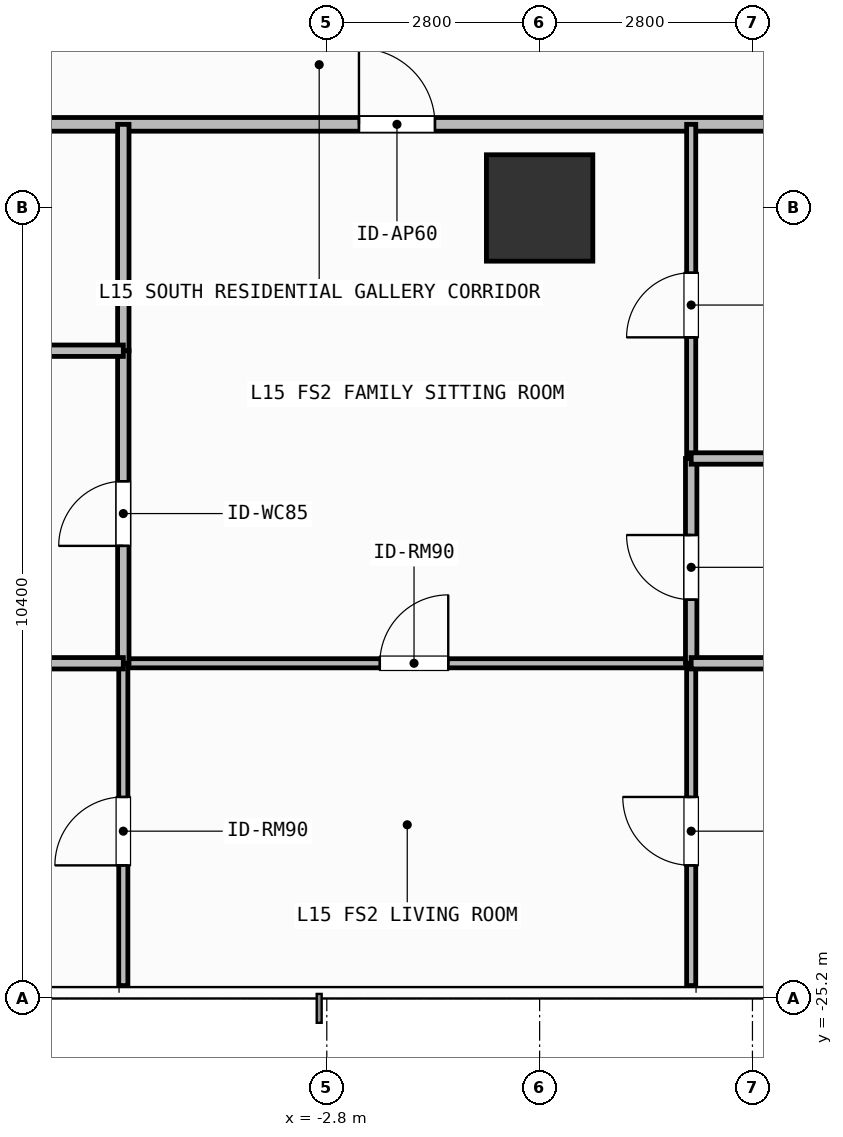
"""IFC4 building model, lengths in metres.
Left out: names, types, materials, properties, quantities, classifications, styles, units other than length and angle.
Written with IfcOpenShell. Run it as: python <this file> out.ifc"""

import sys

from ifc_helpers import new_model, si_unit, direction, frame, frame_2d, origin, origin_2d, place, context, subcontext, project, spatial, rectangle, extrude, element, fill, save


model = new_model("IFC4")
c1 = context("Model", 3, precision=1e-05, world=origin(), true_north=direction((0.0, 1.0)))
c2 = subcontext(c1, "Body", "Model", "MODEL_VIEW")
j1 = project(units=[si_unit("LENGTHUNIT", "METRE"), si_unit("PLANEANGLEUNIT", "RADIAN")], contexts=[c1])
p1 = place(None, origin())
s1 = spatial("IfcSite", under=j1, at=p1, CompositionType="ELEMENT")
p2 = place(p1, origin())
s2 = spatial("IfcBuilding", under=s1, at=p2, CompositionType="ELEMENT")
p3 = place(p2, frame((0.0, 0.0, 57.9)))
s3 = spatial("IfcBuildingStorey", under=s2, at=p3, CompositionType="ELEMENT", Elevation=57.9)
p4 = place(p3, frame((0.0, -14.8, 0.0), z_axis=(0.0, 0.0, 1.0), x_axis=(1.0, 0.0, 0.0)))
e1 = element("IfcColumn", 1, at=p4, inside=s3, PredefinedType="COLUMN", context=c2, shape_type="SweptSolid", body=[
    extrude(rectangle(XDim=1.4, YDim=1.4, at=origin_2d()), origin(), (0.0, 0.0, 1.0), 3.9),
])
p5 = place(p3, frame((-12.225, -13.7, 0.0), z_axis=(0.0, 0.0, 1.0), x_axis=(1.0, 0.0, 0.0)))
e2 = element("IfcWall", 2, at=p5, inside=s3, PredefinedType="PARTITIONING", context=c2, shape_type="SweptSolid", body=[
    extrude(rectangle(XDim=17.467, YDim=0.18, at=frame_2d((8.733, 0.0))), origin(), (0.0, 0.0, 1.0), 3.68),
])
p6 = place(p5, frame((9.848, 0.0, 0.0)))
e3 = element("IfcOpeningElement", 3, at=p6, cuts=e2, PredefinedType="OPENING", context=c2, shape_type="SweptSolid", body=[
    extrude(rectangle(XDim=1.0, YDim=2.2, at=frame_2d((0.5, 1.1))), frame((0.0, 0.1, 0.0), z_axis=(0.0, -1.0, 0.0), x_axis=(1.0, 0.0, 0.0)), (0.0, 0.0, 1.0), 0.2),
])
p7 = place(p3, frame((-5.477, -20.79, 0.0), z_axis=(0.0, 0.0, 1.0), x_axis=(1.0, 0.0, 0.0)))
e4 = element("IfcWall", 4, at=p7, inside=s3, PredefinedType="PARTITIONING", context=c2, shape_type="SweptSolid", body=[
    extrude(rectangle(XDim=7.471, YDim=0.12, at=frame_2d((3.735, 0.0))), origin(), (0.0, 0.0, 1.0), 3.68),
])
p8 = place(p7, frame((3.375, 0.0, 0.0)))
e5 = element("IfcOpeningElement", 5, at=p8, cuts=e4, PredefinedType="OPENING", context=c2, shape_type="SweptSolid", body=[
    extrude(rectangle(XDim=0.9, YDim=2.1, at=frame_2d((0.45, 1.05))), frame((0.0, 0.07, 0.0), z_axis=(0.0, -1.0, 0.0), x_axis=(1.0, 0.0, 0.0)), (0.0, 0.0, 1.0), 0.14),
])
p9 = place(p3, frame((-5.477, -20.79, 0.0), z_axis=(0.0, 0.0, 1.0), x_axis=(0.0, 1.0, 0.0)))
e6 = element("IfcWall", 6, at=p9, inside=s3, PredefinedType="PARTITIONING", context=c2, shape_type="SweptSolid", body=[
    extrude(rectangle(XDim=4.112, YDim=0.15, at=frame_2d((2.056, 0.0))), origin(), (0.0, 0.0, 1.0), 3.68),
])
p10 = place(p9, frame((1.544, 0.0, 0.0)))
e7 = element("IfcOpeningElement", 7, at=p10, cuts=e6, PredefinedType="OPENING", context=c2, shape_type="SweptSolid", body=[
    extrude(rectangle(XDim=0.85, YDim=2.1, at=frame_2d((0.425, 1.05))), frame((0.0, 0.085, 0.0), z_axis=(0.0, -1.0, 0.0), x_axis=(1.0, 0.0, 0.0)), (0.0, 0.0, 1.0), 0.17),
])
p11 = place(p3, frame((-5.477, -16.678, 0.0), z_axis=(0.0, 0.0, 1.0), x_axis=(0.0, 1.0, 0.0)))
e8 = element("IfcWall", 8, at=p11, inside=s3, PredefinedType="PARTITIONING", context=c2, shape_type="SweptSolid", body=[
    extrude(rectangle(XDim=2.978, YDim=0.15, at=frame_2d((1.489, 0.0))), origin(), (0.0, 0.0, 1.0), 3.68),
])
p12 = place(p3, frame((-5.477, -25.03, 0.0), z_axis=(0.0, 0.0, 1.0), x_axis=(0.0, 1.0, 0.0)))
e9 = element("IfcWall", 9, at=p12, inside=s3, PredefinedType="PARTITIONING", context=c2, shape_type="SweptSolid", body=[
    extrude(rectangle(XDim=4.24, YDim=0.12, at=frame_2d((2.12, 0.0))), origin(), (0.0, 0.0, 1.0), 3.68),
])
p13 = place(p12, frame((1.581, 0.0, 0.0)))
e10 = element("IfcOpeningElement", 10, at=p13, cuts=e9, PredefinedType="OPENING", context=c2, shape_type="SweptSolid", body=[
    extrude(rectangle(XDim=0.9, YDim=2.1, at=frame_2d((0.45, 1.05))), frame((0.0, 0.07, 0.0), z_axis=(0.0, -1.0, 0.0), x_axis=(1.0, 0.0, 0.0)), (0.0, 0.0, 1.0), 0.14),
])
p14 = place(p3, frame((1.994, -20.79, 0.0), z_axis=(0.0, 0.0, 1.0), x_axis=(0.0, 1.0, 0.0)))
e11 = element("IfcWall", 11, at=p14, inside=s3, PredefinedType="PARTITIONING", context=c2, shape_type="SweptSolid", body=[
    extrude(rectangle(XDim=2.694, YDim=0.15, at=frame_2d((1.347, 0.0))), origin(), (0.0, 0.0, 1.0), 3.68),
])
p15 = place(p14, frame((0.837, 0.0, 0.0)))
e12 = element("IfcOpeningElement", 12, at=p15, cuts=e11, PredefinedType="OPENING", context=c2, shape_type="SweptSolid", body=[
    extrude(rectangle(XDim=0.85, YDim=2.1, at=frame_2d((0.425, 1.05))), frame((0.0, 0.085, 0.0), z_axis=(0.0, -1.0, 0.0), x_axis=(1.0, 0.0, 0.0)), (0.0, 0.0, 1.0), 0.17),
])
p16 = place(p3, frame((1.994, -18.096, 0.0), z_axis=(0.0, 0.0, 1.0), x_axis=(0.0, 1.0, 0.0)))
e13 = element("IfcWall", 13, at=p16, inside=s3, PredefinedType="PARTITIONING", context=c2, shape_type="SweptSolid", body=[
    extrude(rectangle(XDim=4.396, YDim=0.12, at=frame_2d((2.198, 0.0))), origin(), (0.0, 0.0, 1.0), 3.68),
])
p17 = place(p16, frame((1.594, 0.0, 0.0)))
e14 = element("IfcOpeningElement", 14, at=p17, cuts=e13, PredefinedType="OPENING", context=c2, shape_type="SweptSolid", body=[
    extrude(rectangle(XDim=0.85, YDim=2.1, at=frame_2d((0.425, 1.05))), frame((0.0, 0.07, 0.0), z_axis=(0.0, -1.0, 0.0), x_axis=(1.0, 0.0, 0.0)), (0.0, 0.0, 1.0), 0.14),
])
p18 = place(p3, frame((1.994, -25.03, 0.0), z_axis=(0.0, 0.0, 1.0), x_axis=(0.0, 1.0, 0.0)))
e15 = element("IfcWall", 15, at=p18, inside=s3, PredefinedType="PARTITIONING", context=c2, shape_type="SweptSolid", body=[
    extrude(rectangle(XDim=4.24, YDim=0.12, at=frame_2d((2.12, 0.0))), origin(), (0.0, 0.0, 1.0), 3.68),
])
p19 = place(p18, frame((1.581, 0.0, 0.0)))
e16 = element("IfcOpeningElement", 16, at=p19, cuts=e15, PredefinedType="OPENING", context=c2, shape_type="SweptSolid", body=[
    extrude(rectangle(XDim=0.9, YDim=2.1, at=frame_2d((0.45, 1.05))), frame((0.0, 0.07, 0.0), z_axis=(0.0, -1.0, 0.0), x_axis=(1.0, 0.0, 0.0)), (0.0, 0.0, 1.0), 0.14),
])
p20 = place(p3, frame((-12.225, -16.678, 0.0), z_axis=(0.0, 0.0, 1.0), x_axis=(1.0, 0.0, 0.0)))
e17 = element("IfcWall", 17, at=p20, inside=s3, PredefinedType="PARTITIONING", context=c2, shape_type="SweptSolid", body=[
    extrude(rectangle(XDim=6.748, YDim=0.15, at=frame_2d((3.374, 0.0))), origin(), (0.0, 0.0, 1.0), 3.68),
])
p21 = place(p20, frame((2.859, 0.0, 0.0)))
e18 = element("IfcOpeningElement", 18, at=p21, cuts=e17, PredefinedType="OPENING", context=c2, shape_type="SweptSolid", body=[
    extrude(rectangle(XDim=0.85, YDim=2.1, at=frame_2d((0.425, 1.05))), frame((0.0, 0.085, 0.0), z_axis=(0.0, -1.0, 0.0), x_axis=(1.0, 0.0, 0.0)), (0.0, 0.0, 1.0), 0.17),
])
p22 = place(p3, frame((-12.225, -20.79, 0.0), z_axis=(0.0, 0.0, 1.0), x_axis=(1.0, 0.0, 0.0)))
e19 = element("IfcWall", 19, at=p22, inside=s3, PredefinedType="PARTITIONING", context=c2, shape_type="SweptSolid", body=[
    extrude(rectangle(XDim=6.748, YDim=0.15, at=frame_2d((3.374, 0.0))), origin(), (0.0, 0.0, 1.0), 3.68),
])
for number, where, z_axis, x_axis in (
    (20, (1.994, -18.096, 0.0), (0.0, 0.0, 1.0), (1.0, 0.0, 0.0)),
    (21, (1.994, -20.79, 0.0), (0.0, 0.0, 1.0), (1.0, 0.0, 0.0)),
):
    element("IfcWall", number, at=place(p3, frame(where, z_axis=z_axis, x_axis=x_axis)), inside=s3, PredefinedType="PARTITIONING", context=c2, shape_type="SweptSolid", body=[
        extrude(rectangle(XDim=3.248, YDim=0.15, at=frame_2d((1.624, 0.0))), origin(), (0.0, 0.0, 1.0), 3.68),
    ])
p23 = place(p6, origin())
e22 = element("IfcDoor", 22, at=p23, inside=s3, OperationType="SINGLE_SWING_LEFT", PredefinedType="DOOR", context=c2, shape_type="SweptSolid", body=[
    extrude(rectangle(XDim=1.0, YDim=2.2, at=frame_2d((0.5, 1.1))), frame((0.0, 0.025, 0.0), z_axis=(0.0, -1.0, 0.0), x_axis=(1.0, 0.0, 0.0)), (0.0, 0.0, 1.0), 0.05),
])
fill(e3, e22)
p24 = place(p8, origin())
e23 = element("IfcDoor", 23, at=p24, inside=s3, OperationType="SINGLE_SWING_RIGHT", PredefinedType="DOOR", context=c2, shape_type="SweptSolid", body=[
    extrude(rectangle(XDim=0.9, YDim=2.1, at=frame_2d((0.45, 1.05))), frame((0.0, 0.025, 0.0), z_axis=(0.0, -1.0, 0.0), x_axis=(1.0, 0.0, 0.0)), (0.0, 0.0, 1.0), 0.05),
])
fill(e5, e23)
p25 = place(p10, origin())
e24 = element("IfcDoor", 24, at=p25, inside=s3, OperationType="SINGLE_SWING_LEFT", PredefinedType="DOOR", context=c2, shape_type="SweptSolid", body=[
    extrude(rectangle(XDim=0.85, YDim=2.1, at=frame_2d((0.425, 1.05))), frame((0.0, 0.025, 0.0), z_axis=(0.0, -1.0, 0.0), x_axis=(1.0, 0.0, 0.0)), (0.0, 0.0, 1.0), 0.05),
])
fill(e7, e24)
p26 = place(p13, origin())
e25 = element("IfcDoor", 25, at=p26, inside=s3, OperationType="SINGLE_SWING_LEFT", PredefinedType="DOOR", context=c2, shape_type="SweptSolid", body=[
    extrude(rectangle(XDim=0.9, YDim=2.1, at=frame_2d((0.45, 1.05))), frame((0.0, 0.025, 0.0), z_axis=(0.0, -1.0, 0.0), x_axis=(1.0, 0.0, 0.0)), (0.0, 0.0, 1.0), 0.05),
])
fill(e10, e25)
p27 = place(p15, origin())
e26 = element("IfcDoor", 26, at=p27, inside=s3, OperationType="SINGLE_SWING_RIGHT", PredefinedType="DOOR", context=c2, shape_type="SweptSolid", body=[
    extrude(rectangle(XDim=0.85, YDim=2.1, at=frame_2d((0.425, 1.05))), frame((0.0, 0.025, 0.0), z_axis=(0.0, -1.0, 0.0), x_axis=(1.0, 0.0, 0.0)), (0.0, 0.0, 1.0), 0.05),
])
fill(e12, e26)
p28 = place(p17, origin())
e27 = element("IfcDoor", 27, at=p28, inside=s3, OperationType="SINGLE_SWING_LEFT", PredefinedType="DOOR", context=c2, shape_type="SweptSolid", body=[
    extrude(rectangle(XDim=0.85, YDim=2.1, at=frame_2d((0.425, 1.05))), frame((0.0, 0.025, 0.0), z_axis=(0.0, -1.0, 0.0), x_axis=(1.0, 0.0, 0.0)), (0.0, 0.0, 1.0), 0.05),
])
fill(e14, e27)
p29 = place(p19, origin())
e28 = element("IfcDoor", 28, at=p29, inside=s3, OperationType="SINGLE_SWING_RIGHT", PredefinedType="DOOR", context=c2, shape_type="SweptSolid", body=[
    extrude(rectangle(XDim=0.9, YDim=2.1, at=frame_2d((0.45, 1.05))), frame((0.0, 0.025, 0.0), z_axis=(0.0, -1.0, 0.0), x_axis=(1.0, 0.0, 0.0)), (0.0, 0.0, 1.0), 0.05),
])
fill(e16, e28)
save(model, sys.argv[1])
